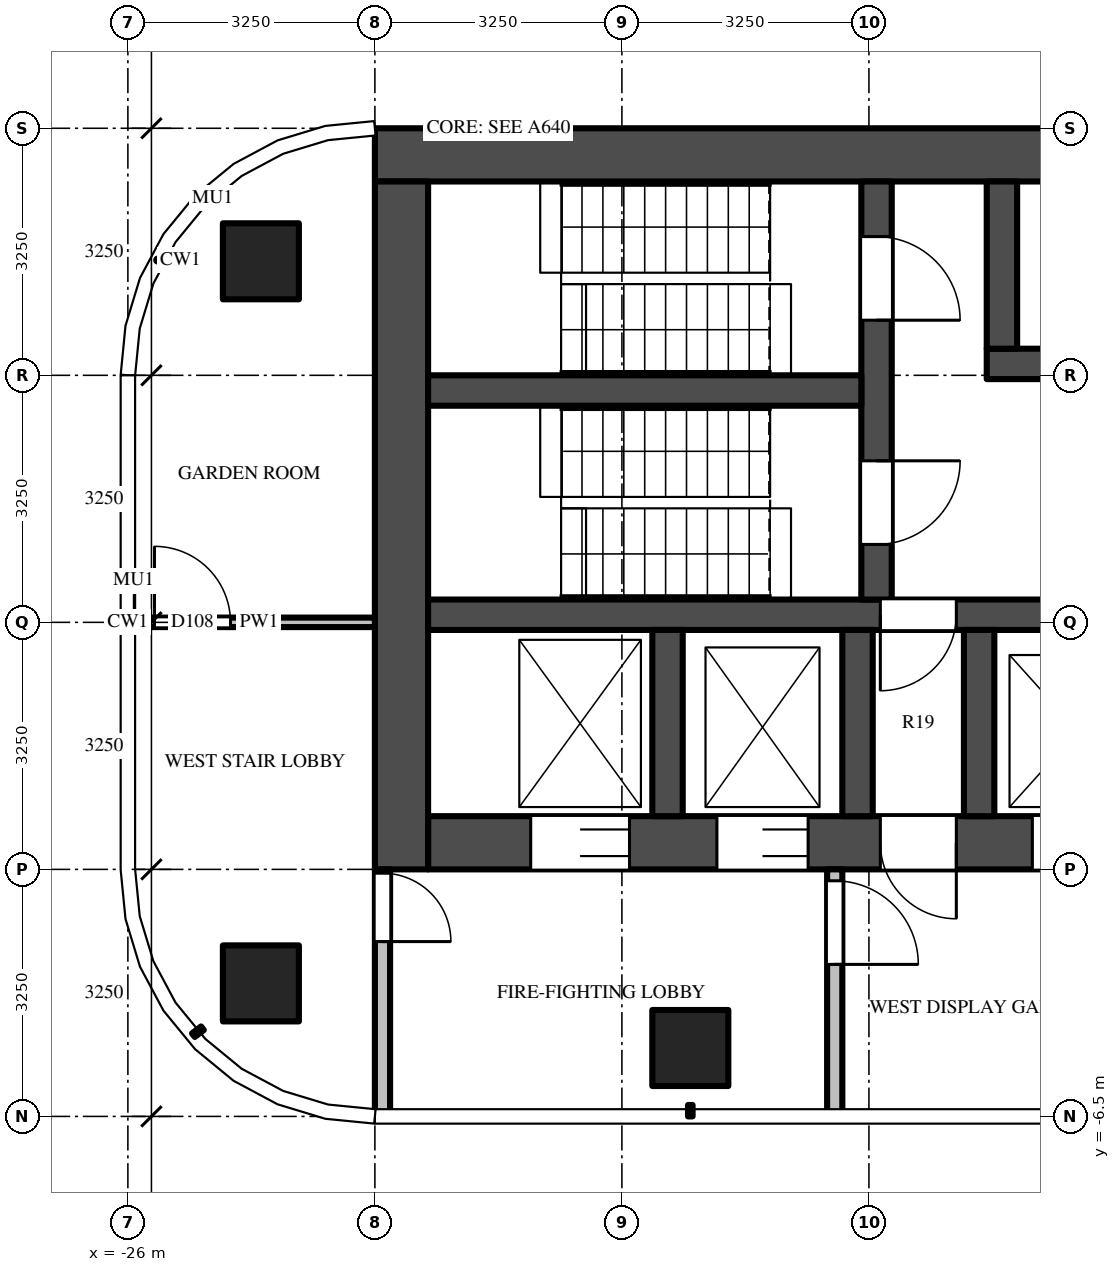
"""IFC4 building model, lengths in metres.
Left out: names, types, materials, properties, quantities, classifications, styles, units other than length and angle.
Written with IfcOpenShell. Run it as: python <this file> out.ifc"""

import sys

from ifc_helpers import new_model, si_unit, direction, frame, frame_2d, origin, origin_2d, place, context, subcontext, project, spatial, rectangle, extrude, source, transform, mapped, element, fill, save


model = new_model("IFC4")
c1 = context("Model", 3, precision=1e-05, world=origin(), true_north=direction((0.0, 1.0)))
c2 = subcontext(c1, "Body", "Model", "MODEL_VIEW")
j1 = project(units=[si_unit("LENGTHUNIT", "METRE"), si_unit("PLANEANGLEUNIT", "RADIAN")], contexts=[c1])
p1 = place(None, origin())
s1 = spatial("IfcSite", under=j1, at=p1, CompositionType="ELEMENT")
p2 = place(p1, origin())
s2 = spatial("IfcBuilding", under=s1, at=p2, CompositionType="ELEMENT")
p3 = place(p2, frame((0.0, 0.0, 306.7)))
s3 = spatial("IfcBuildingStorey", under=s2, at=p3, CompositionType="ELEMENT", Elevation=306.7)
m1 = source(origin(), c2, "Body", "SweptSolid", [
    extrude(rectangle(XDim=1.0, YDim=1.0, at=origin_2d()), origin(), (0.0, 0.0, 1.0), 3.9),
])
for number, where, z_axis, x_axis in (
    (1, (-18.6, -5.6, 0.0), (0.0, 0.0, 1.0), (1.0, 0.0, 0.0)),
    (2, (-24.25, -4.75, 0.0), (0.0, 0.0, 1.0), (1.0, 0.0, 0.0)),
    (3, (-24.25, 4.75, 0.0), (0.0, 0.0, 1.0), (1.0, 0.0, 0.0)),
):
    element("IfcColumn", number, at=place(p3, frame(where, z_axis=z_axis, x_axis=x_axis)), inside=s3, PredefinedType="COLUMN", context=c2, shape_type="MappedRepresentation", body=[
        mapped(m1, transform((0.0, 0.0, 0.0))),
    ])
m2 = source(origin(), c2, "Body", "SweptSolid", [
    extrude(rectangle(XDim=16.65, YDim=0.7, at=frame_2d((8.325, 0.0))), origin(), (0.0, 0.0, 1.0), 3.7),
])
p4 = place(p3, frame((-6.1, 6.15, 0.0), z_axis=(0.0, 0.0, 1.0), x_axis=(-1.0, 0.0, 0.0)))
e4 = element("IfcWall", 4, at=p4, inside=s3, PredefinedType="SHEAR", context=c2, shape_type="MappedRepresentation", body=[
    mapped(m2, transform((0.0, 0.0, 0.0))),
])
m3 = source(origin(), c2, "Body", "SweptSolid", [
    extrude(rectangle(XDim=14.85, YDim=0.7, at=frame_2d((7.425, 0.0))), origin(), (0.0, 0.0, 1.0), 3.7),
])
p5 = place(p3, frame((-7.2, -2.9, 0.0), z_axis=(0.0, 0.0, 1.0), x_axis=(-1.0, 0.0, 0.0)))
e5 = element("IfcWall", 5, at=p5, inside=s3, PredefinedType="SHEAR", context=c2, shape_type="MappedRepresentation", body=[
    mapped(m3, transform((0.0, 0.0, 0.0))),
])
m4 = source(origin(), c2, "Body", "SweptSolid", [
    extrude(rectangle(XDim=1.2, YDim=2.1, at=frame_2d((0.6, 1.05))), frame((0.0, 0.36, 0.0), z_axis=(0.0, -1.0, 0.0), x_axis=(1.0, 0.0, 0.0)), (0.0, 0.0, 1.0), 0.72),
])
p6 = place(p5, frame((5.7, 0.0, 0.0)))
e6 = element("IfcOpeningElement", 6, at=p6, cuts=e5, PredefinedType="OPENING", context=c2, shape_type="MappedRepresentation", body=[
    mapped(m4, transform((0.0, 0.0, 0.0))),
])
m5 = source(origin(), c2, "Body", "SweptSolid", [
    extrude(rectangle(XDim=1.3, YDim=2.1, at=frame_2d((0.65, 1.05))), frame((0.0, 0.36, 0.0), z_axis=(0.0, -1.0, 0.0), x_axis=(1.0, 0.0, 0.0)), (0.0, 0.0, 1.0), 0.72),
])
p7 = place(p5, frame((12.2, 0.0, 0.0)))
e7 = element("IfcOpeningElement", 7, at=p7, cuts=e5, PredefinedType="OPENING", context=c2, shape_type="MappedRepresentation", body=[
    mapped(m5, transform((0.0, 0.0, 0.0))),
])
p8 = place(p5, frame((9.85, 0.0, 0.0)))
e8 = element("IfcOpeningElement", 8, at=p8, cuts=e5, PredefinedType="OPENING", context=c2, shape_type="MappedRepresentation", body=[
    mapped(m4, transform((0.0, 0.0, 0.0))),
])
m6 = source(origin(), c2, "Body", "SweptSolid", [
    extrude(rectangle(XDim=1.0, YDim=2.1, at=frame_2d((0.5, 1.05))), frame((0.0, 0.36, 0.0), z_axis=(0.0, -1.0, 0.0), x_axis=(1.0, 0.0, 0.0)), (0.0, 0.0, 1.0), 0.72),
])
p9 = place(p5, frame((7.9, 0.0, 0.0)))
e9 = element("IfcOpeningElement", 9, at=p9, cuts=e5, PredefinedType="OPENING", context=c2, shape_type="MappedRepresentation", body=[
    mapped(m6, transform((0.0, 0.0, 0.0))),
])
m7 = source(origin(), c2, "Body", "SweptSolid", [
    extrude(rectangle(XDim=0.8, YDim=2.1, at=frame_2d((0.4, 1.05))), frame((0.0, 0.36, 0.0), z_axis=(0.0, -1.0, 0.0), x_axis=(1.0, 0.0, 0.0)), (0.0, 0.0, 1.0), 0.72),
])
p10 = place(p5, frame((0.212, 0.0, 0.0)))
e10 = element("IfcOpeningElement", 10, at=p10, cuts=e5, PredefinedType="OPENING", context=c2, shape_type="MappedRepresentation", body=[
    mapped(m7, transform((0.0, 0.0, 0.0))),
])
p11 = place(p5, frame((1.95, 0.0, 0.0)))
e11 = element("IfcOpeningElement", 11, at=p11, cuts=e5, PredefinedType="OPENING", context=c2, shape_type="MappedRepresentation", body=[
    mapped(m6, transform((0.0, 0.0, 0.0))),
])
p12 = place(p5, frame((3.837, 0.0, 0.0)))
e12 = element("IfcOpeningElement", 12, at=p12, cuts=e5, PredefinedType="OPENING", context=c2, shape_type="MappedRepresentation", body=[
    mapped(m7, transform((0.0, 0.0, 0.0))),
])
m8 = source(origin(), c2, "Body", "SweptSolid", [
    extrude(rectangle(XDim=9.05, YDim=0.7, at=frame_2d((4.525, 0.0))), origin(), (0.0, 0.0, 1.0), 3.7),
])
p13 = place(p3, frame((-22.4, 5.8, 0.0), z_axis=(0.0, 0.0, 1.0), x_axis=(0.0, -1.0, 0.0)))
e13 = element("IfcWall", 13, at=p13, inside=s3, PredefinedType="SHEAR", context=c2, shape_type="MappedRepresentation", body=[
    mapped(m8, transform((0.0, 0.0, 0.0))),
])
m9 = source(origin(), c2, "Body", "SweptSolid", [
    extrude(rectangle(XDim=7.5, YDim=0.4, at=frame_2d((3.75, 0.0))), origin(), (0.0, 0.0, 1.0), 3.7),
])
p14 = place(p3, frame((-7.2, 3.4, 0.0), z_axis=(0.0, 0.0, 1.0), x_axis=(-1.0, 0.0, 0.0)))
e14 = element("IfcWall", 14, at=p14, inside=s3, PredefinedType="SHEAR", context=c2, shape_type="MappedRepresentation", body=[
    mapped(m9, transform((0.0, 0.0, 0.0))),
])
m10 = source(origin(), c2, "Body", "SweptSolid", [
    extrude(rectangle(XDim=0.8, YDim=2.1, at=frame_2d((0.4, 1.05))), frame((0.0, 0.21, 0.0), z_axis=(0.0, -1.0, 0.0), x_axis=(1.0, 0.0, 0.0)), (0.0, 0.0, 1.0), 0.42),
])
p15 = place(p14, frame((0.212, 0.0, 0.0)))
e15 = element("IfcOpeningElement", 15, at=p15, cuts=e14, PredefinedType="OPENING", context=c2, shape_type="MappedRepresentation", body=[
    mapped(m10, transform((0.0, 0.0, 0.0))),
])
m11 = source(origin(), c2, "Body", "SweptSolid", [
    extrude(rectangle(XDim=0.9, YDim=2.1, at=frame_2d((0.45, 1.05))), frame((0.0, 0.21, 0.0), z_axis=(0.0, -1.0, 0.0), x_axis=(1.0, 0.0, 0.0)), (0.0, 0.0, 1.0), 0.42),
])
p16 = place(p14, frame((1.75, 0.0, 0.0)))
e16 = element("IfcOpeningElement", 16, at=p16, cuts=e14, PredefinedType="OPENING", context=c2, shape_type="MappedRepresentation", body=[
    mapped(m11, transform((0.0, 0.0, 0.0))),
])
m12 = source(origin(), c2, "Body", "SweptSolid", [
    extrude(rectangle(XDim=1.0, YDim=2.1, at=frame_2d((0.5, 1.05))), frame((0.0, 0.21, 0.0), z_axis=(0.0, -1.0, 0.0), x_axis=(1.0, 0.0, 0.0)), (0.0, 0.0, 1.0), 0.42),
])
p17 = place(p14, frame((4.637, 0.0, 0.0)))
e17 = element("IfcOpeningElement", 17, at=p17, cuts=e14, PredefinedType="OPENING", context=c2, shape_type="MappedRepresentation", body=[
    mapped(m12, transform((0.0, 0.0, 0.0))),
])
m13 = source(origin(), c2, "Body", "SweptSolid", [
    extrude(rectangle(XDim=14.85, YDim=0.4, at=frame_2d((7.425, 0.0))), origin(), (0.0, 0.0, 1.0), 3.7),
])
p18 = place(p3, frame((-7.2, 0.1, 0.0), z_axis=(0.0, 0.0, 1.0), x_axis=(-1.0, 0.0, 0.0)))
e18 = element("IfcWall", 18, at=p18, inside=s3, PredefinedType="SHEAR", context=c2, shape_type="MappedRepresentation", body=[
    mapped(m13, transform((0.0, 0.0, 0.0))),
])
p19 = place(p18, frame((7.9, 0.0, 0.0)))
e19 = element("IfcOpeningElement", 19, at=p19, cuts=e18, PredefinedType="OPENING", context=c2, shape_type="MappedRepresentation", body=[
    mapped(m12, transform((0.0, 0.0, 0.0))),
])
m14 = source(origin(), c2, "Body", "SweptSolid", [
    extrude(rectangle(XDim=5.5, YDim=0.4, at=frame_2d((2.75, 0.0))), origin(), (0.0, 0.0, 1.0), 3.7),
])
p20 = place(p3, frame((-16.15, 5.8, 0.0), z_axis=(0.0, 0.0, 1.0), x_axis=(0.0, -1.0, 0.0)))
e20 = element("IfcWall", 20, at=p20, inside=s3, PredefinedType="SHEAR", context=c2, shape_type="MappedRepresentation", body=[
    mapped(m14, transform((0.0, 0.0, 0.0))),
])
m15 = source(origin(), c2, "Body", "SweptSolid", [
    extrude(rectangle(XDim=1.1, YDim=2.1, at=frame_2d((0.55, 1.05))), frame((0.0, 0.21, 0.0), z_axis=(0.0, -1.0, 0.0), x_axis=(1.0, 0.0, 0.0)), (0.0, 0.0, 1.0), 0.42),
])
p21 = place(p20, frame((0.725, 0.0, 0.0)))
e21 = element("IfcOpeningElement", 21, at=p21, cuts=e20, PredefinedType="OPENING", context=c2, shape_type="MappedRepresentation", body=[
    mapped(m15, transform((0.0, 0.0, 0.0))),
])
p22 = place(p20, frame((3.675, 0.0, 0.0)))
e22 = element("IfcOpeningElement", 22, at=p22, cuts=e20, PredefinedType="OPENING", context=c2, shape_type="MappedRepresentation", body=[
    mapped(m15, transform((0.0, 0.0, 0.0))),
])
m16 = source(origin(), c2, "Body", "SweptSolid", [
    extrude(rectangle(XDim=5.7, YDim=0.4, at=frame_2d((2.85, 0.0))), origin(), (0.0, 0.0, 1.0), 3.7),
])
p23 = place(p3, frame((-16.35, 3.05, 0.0), z_axis=(0.0, 0.0, 1.0), x_axis=(-1.0, 0.0, 0.0)))
e23 = element("IfcWall", 23, at=p23, inside=s3, PredefinedType="SHEAR", context=c2, shape_type="MappedRepresentation", body=[
    mapped(m16, transform((0.0, 0.0, 0.0))),
])
m17 = source(origin(), c2, "Body", "SweptSolid", [
    extrude(rectangle(XDim=2.2, YDim=0.4, at=frame_2d((1.1, 0.0))), origin(), (0.0, 0.0, 1.0), 3.7),
])
p24 = place(p3, frame((-14.5, 5.8, 0.0), z_axis=(0.0, 0.0, 1.0), x_axis=(0.0, -1.0, 0.0)))
e24 = element("IfcWall", 24, at=p24, inside=s3, PredefinedType="SHEAR", context=c2, shape_type="MappedRepresentation", body=[
    mapped(m17, transform((0.0, 0.0, 0.0))),
])
m18 = source(origin(), c2, "Body", "SweptSolid", [
    extrude(rectangle(XDim=2.45, YDim=0.4, at=frame_2d((1.225, 0.0))), origin(), (0.0, 0.0, 1.0), 3.7),
])
for number, where, z_axis, x_axis in (
    (25, (-14.8, -0.1, 0.0), (0.0, 0.0, 1.0), (0.0, -1.0, 0.0)),
    (26, (-16.4, -0.1, 0.0), (0.0, 0.0, 1.0), (0.0, -1.0, 0.0)),
    (27, (-18.9, -0.1, 0.0), (0.0, 0.0, 1.0), (0.0, -1.0, 0.0)),
):
    element("IfcWall", number, at=place(p3, frame(where, z_axis=z_axis, x_axis=x_axis)), inside=s3, PredefinedType="SHEAR", context=c2, shape_type="MappedRepresentation", body=[
        mapped(m18, transform((0.0, 0.0, 0.0))),
    ])
m19 = source(origin(), c2, "Body", "SweptSolid", [
    extrude(rectangle(XDim=3.25, YDim=0.2, at=frame_2d((1.625, 0.0))), origin(), (0.0, 0.0, 1.0), 3.7),
])
p25 = place(p3, frame((-16.7, -3.25, 0.0), z_axis=(0.0, 0.0, 1.0), x_axis=(0.0, -1.0, 0.0)))
e28 = element("IfcWall", 28, at=p25, inside=s3, PredefinedType="PARTITIONING", context=c2, shape_type="MappedRepresentation", body=[
    mapped(m19, transform((0.0, 0.0, 0.0))),
])
m20 = source(origin(), c2, "Body", "SweptSolid", [
    extrude(rectangle(XDim=1.1, YDim=2.1, at=frame_2d((0.55, 1.05))), frame((0.0, 0.11, 0.0), z_axis=(0.0, -1.0, 0.0), x_axis=(1.0, 0.0, 0.0)), (0.0, 0.0, 1.0), 0.22),
])
p26 = place(p25, frame((0.15, 0.0, 0.0)))
e29 = element("IfcOpeningElement", 29, at=p26, cuts=e28, PredefinedType="OPENING", context=c2, shape_type="MappedRepresentation", body=[
    mapped(m20, transform((0.0, 0.0, 0.0))),
])
p27 = place(p3, frame((-22.65, -3.25, 0.0), z_axis=(0.0, 0.0, 1.0), x_axis=(0.0, -1.0, 0.0)))
e30 = element("IfcWall", 30, at=p27, inside=s3, PredefinedType="PARTITIONING", context=c2, shape_type="MappedRepresentation", body=[
    mapped(m19, transform((0.0, 0.0, 0.0))),
])
m21 = source(origin(), c2, "Body", "SweptSolid", [
    extrude(rectangle(XDim=0.9, YDim=2.1, at=frame_2d((0.45, 1.05))), frame((0.0, 0.11, 0.0), z_axis=(0.0, -1.0, 0.0), x_axis=(1.0, 0.0, 0.0)), (0.0, 0.0, 1.0), 0.22),
])
p28 = place(p27, frame((0.05, 0.0, 0.0)))
e31 = element("IfcOpeningElement", 31, at=p28, cuts=e30, PredefinedType="OPENING", context=c2, shape_type="MappedRepresentation", body=[
    mapped(m21, transform((0.0, 0.0, 0.0))),
])
m22 = source(origin(), c2, "Body", "SweptSolid", [
    extrude(rectangle(XDim=3.05, YDim=0.125, at=frame_2d((1.525, 0.0))), origin(), (0.0, 0.0, 1.0), 2.78),
])
p29 = place(p3, frame((-25.8, 0.0, 0.0), z_axis=(0.0, 0.0, 1.0), x_axis=(1.0, 0.0, 0.0)))
e32 = element("IfcWall", 32, at=p29, inside=s3, PredefinedType="PARTITIONING", context=c2, shape_type="MappedRepresentation", body=[
    mapped(m22, transform((0.0, 0.0, 0.0))),
])
m23 = source(origin(), c2, "Body", "SweptSolid", [
    extrude(rectangle(XDim=1.0, YDim=2.1, at=frame_2d((0.5, 1.05))), frame((0.0, 0.073, 0.0), z_axis=(0.0, -1.0, 0.0), x_axis=(1.0, 0.0, 0.0)), (0.0, 0.0, 1.0), 0.145),
])
p30 = place(p29, frame((0.15, 0.0, 0.0)))
e33 = element("IfcOpeningElement", 33, at=p30, cuts=e32, PredefinedType="OPENING", context=c2, shape_type="MappedRepresentation", body=[
    mapped(m23, transform((0.0, 0.0, 0.0))),
])
m24 = source(origin(), c2, "Body", "SweptSolid", [
    extrude(rectangle(XDim=1.2, YDim=2.1, at=frame_2d((0.6, 1.05))), frame((0.0, -0.275, 0.0), z_axis=(0.0, -1.0, 0.0), x_axis=(1.0, 0.0, 0.0)), (0.0, 0.0, 1.0), 0.05),
])
p31 = place(p6, origin())
e34 = element("IfcDoor", 34, at=p31, inside=s3, OperationType="DOUBLE_DOOR_SLIDING", PredefinedType="DOOR", context=c2, shape_type="MappedRepresentation", body=[
    mapped(m24, transform((0.0, 0.0, 0.0))),
])
fill(e6, e34)
m25 = source(origin(), c2, "Body", "SweptSolid", [
    extrude(rectangle(XDim=1.3, YDim=2.1, at=frame_2d((0.65, 1.05))), frame((0.0, -0.275, 0.0), z_axis=(0.0, -1.0, 0.0), x_axis=(1.0, 0.0, 0.0)), (0.0, 0.0, 1.0), 0.05),
])
p32 = place(p7, origin())
e35 = element("IfcDoor", 35, at=p32, inside=s3, OperationType="DOUBLE_DOOR_SLIDING", PredefinedType="DOOR", context=c2, shape_type="MappedRepresentation", body=[
    mapped(m25, transform((0.0, 0.0, 0.0))),
])
fill(e7, e35)
p33 = place(p8, origin())
e36 = element("IfcDoor", 36, at=p33, inside=s3, OperationType="DOUBLE_DOOR_SLIDING", PredefinedType="DOOR", context=c2, shape_type="MappedRepresentation", body=[
    mapped(m24, transform((0.0, 0.0, 0.0))),
])
fill(e8, e36)
m26 = source(origin(), c2, "Body", "SweptSolid", [
    extrude(rectangle(XDim=1.1, YDim=2.1, at=frame_2d((0.55, 1.05))), frame((0.0, 0.025, 0.0), z_axis=(0.0, -1.0, 0.0), x_axis=(1.0, 0.0, 0.0)), (0.0, 0.0, 1.0), 0.05),
])
p34 = place(p21, origin())
e37 = element("IfcDoor", 37, at=p34, inside=s3, OperationType="SINGLE_SWING_RIGHT", PredefinedType="DOOR", context=c2, shape_type="MappedRepresentation", body=[
    mapped(m26, transform((0.0, 0.0, 0.0))),
])
fill(e21, e37)
p35 = place(p22, origin())
e38 = element("IfcDoor", 38, at=p35, inside=s3, OperationType="SINGLE_SWING_LEFT", PredefinedType="DOOR", context=c2, shape_type="MappedRepresentation", body=[
    mapped(m26, transform((0.0, 0.0, 0.0))),
])
fill(e22, e38)
m27 = source(origin(), c2, "Body", "SweptSolid", [
    extrude(rectangle(XDim=1.0, YDim=2.1, at=frame_2d((0.5, 1.05))), frame((0.0, 0.025, 0.0), z_axis=(0.0, -1.0, 0.0), x_axis=(1.0, 0.0, 0.0)), (0.0, 0.0, 1.0), 0.05),
])
p36 = place(p19, origin())
e39 = element("IfcDoor", 39, at=p36, inside=s3, OperationType="SINGLE_SWING_RIGHT", PredefinedType="DOOR", context=c2, shape_type="MappedRepresentation", body=[
    mapped(m27, transform((0.0, 0.0, 0.0))),
])
fill(e19, e39)
m28 = source(origin(), c2, "Body", "SweptSolid", [
    extrude(rectangle(XDim=1.0, YDim=2.1, at=frame_2d((0.5, 1.05))), frame((0.0, -0.275, 0.0), z_axis=(0.0, -1.0, 0.0), x_axis=(1.0, 0.0, 0.0)), (0.0, 0.0, 1.0), 0.05),
])
p37 = place(p9, origin())
e40 = element("IfcDoor", 40, at=p37, inside=s3, OperationType="SINGLE_SWING_LEFT", PredefinedType="DOOR", context=c2, shape_type="MappedRepresentation", body=[
    mapped(m28, transform((0.0, 0.0, 0.0))),
])
fill(e9, e40)
p38 = place(p26, origin())
e41 = element("IfcDoor", 41, at=p38, inside=s3, OperationType="SINGLE_SWING_RIGHT", PredefinedType="DOOR", context=c2, shape_type="MappedRepresentation", body=[
    mapped(m26, transform((0.0, 0.0, 0.0))),
])
fill(e29, e41)
m29 = source(origin(), c2, "Body", "SweptSolid", [
    extrude(rectangle(XDim=0.9, YDim=2.1, at=frame_2d((0.45, 1.05))), frame((0.0, 0.025, 0.0), z_axis=(0.0, -1.0, 0.0), x_axis=(1.0, 0.0, 0.0)), (0.0, 0.0, 1.0), 0.05),
])
p39 = place(p28, origin())
e42 = element("IfcDoor", 42, at=p39, inside=s3, OperationType="SINGLE_SWING_RIGHT", PredefinedType="DOOR", context=c2, shape_type="MappedRepresentation", body=[
    mapped(m29, transform((0.0, 0.0, 0.0))),
])
fill(e31, e42)
p40 = place(p30, origin())
e43 = element("IfcDoor", 43, at=p40, inside=s3, OperationType="SINGLE_SWING_LEFT", PredefinedType="DOOR", context=c2, shape_type="MappedRepresentation", body=[
    mapped(m27, transform((0.0, 0.0, 0.0))),
])
fill(e33, e43)
save(model, sys.argv[1])
